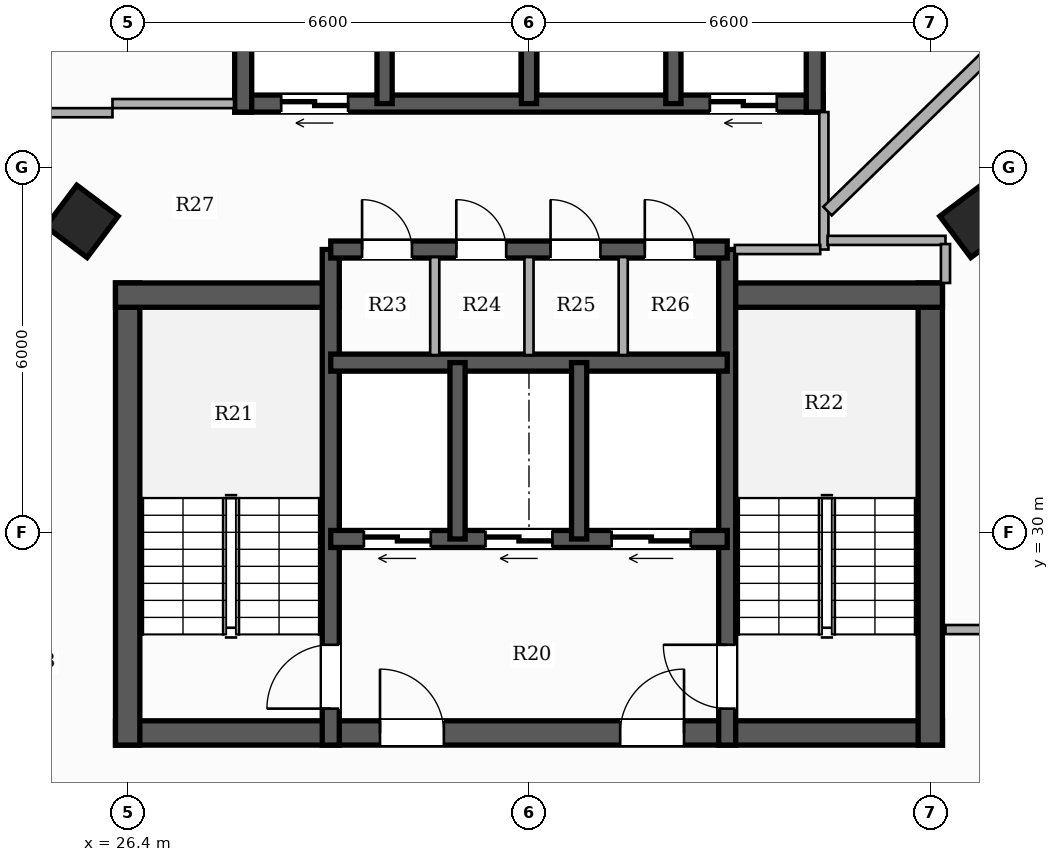
"""IFC4 building model, lengths in metres.
Left out: names, types, materials, properties, quantities, classifications, styles, units other than length and angle.
Written with IfcOpenShell. Run it as: python <this file> out.ifc"""

import sys

from ifc_helpers import new_model, si_unit, direction, frame, frame_2d, origin, origin_2d, place, context, subcontext, project, spatial, rectangle, hollow_rectangle, extrude, element, fill, save


model = new_model("IFC4")
c1 = context("Model", 3, precision=1e-05, world=origin(), true_north=direction((0.0, 1.0)))
c2 = subcontext(c1, "Body", "Model", "MODEL_VIEW")
j1 = project(units=[si_unit("LENGTHUNIT", "METRE"), si_unit("PLANEANGLEUNIT", "RADIAN")], contexts=[c1])
p1 = place(None, origin())
s1 = spatial("IfcSite", under=j1, at=p1, CompositionType="ELEMENT")
p2 = place(p1, origin())
s2 = spatial("IfcBuilding", under=s1, at=p2, CompositionType="ELEMENT")
p3 = place(p2, frame((0.0, 0.0, 106.7)))
s3 = spatial("IfcBuildingStorey", under=s2, at=p3, CompositionType="ELEMENT", Elevation=106.7)
p4 = place(p3, frame((26.2, 26.7, 0.0), z_axis=(0.0, 0.0, 1.0), x_axis=(1.0, 0.0, 0.0)))
e1 = element("IfcWall", 1, at=p4, inside=s3, PredefinedType="SHEAR", context=c2, shape_type="SweptSolid", body=[
    extrude(rectangle(XDim=13.6, YDim=0.4, at=frame_2d((6.8, 0.0))), origin(), (0.0, 0.0, 1.0), 3.3),
])
p5 = place(p4, frame((4.35, 0.0, 0.0)))
e2 = element("IfcOpeningElement", 2, at=p5, cuts=e1, PredefinedType="OPENING", context=c2, shape_type="SweptSolid", body=[
    extrude(rectangle(XDim=1.05, YDim=2.15, at=frame_2d((0.525, 1.075))), frame((0.0, 0.21, 0.0), z_axis=(0.0, -1.0, 0.0), x_axis=(1.0, 0.0, 0.0)), (0.0, 0.0, 1.0), 0.42),
])
p6 = place(p4, frame((8.3, 0.0, 0.0)))
e3 = element("IfcOpeningElement", 3, at=p6, cuts=e1, PredefinedType="OPENING", context=c2, shape_type="SweptSolid", body=[
    extrude(rectangle(XDim=1.05, YDim=2.15, at=frame_2d((0.525, 1.075))), frame((0.0, 0.21, 0.0), z_axis=(0.0, -1.0, 0.0), x_axis=(1.0, 0.0, 0.0)), (0.0, 0.0, 1.0), 0.42),
])
p7 = place(p3, frame((26.4, 26.5, 0.0), z_axis=(0.0, 0.0, 1.0), x_axis=(0.0, 1.0, 0.0)))
e4 = element("IfcWall", 4, at=p7, inside=s3, PredefinedType="SHEAR", context=c2, shape_type="SweptSolid", body=[
    extrude(rectangle(XDim=7.6, YDim=0.4, at=frame_2d((3.8, 0.0))), origin(), (0.0, 0.0, 1.0), 3.3),
])
p8 = place(p3, frame((26.2, 33.9, 0.0), z_axis=(0.0, 0.0, 1.0), x_axis=(1.0, 0.0, 0.0)))
e5 = element("IfcWall", 5, at=p8, inside=s3, PredefinedType="SHEAR", context=c2, shape_type="SweptSolid", body=[
    extrude(rectangle(XDim=3.68, YDim=0.4, at=frame_2d((1.84, 0.0))), origin(), (0.0, 0.0, 1.0), 3.3),
])
p9 = place(p3, frame((39.6, 26.5, 0.0), z_axis=(0.0, 0.0, 1.0), x_axis=(0.0, 1.0, 0.0)))
e6 = element("IfcWall", 6, at=p9, inside=s3, PredefinedType="SHEAR", context=c2, shape_type="SweptSolid", body=[
    extrude(rectangle(XDim=7.6, YDim=0.4, at=frame_2d((3.8, 0.0))), origin(), (0.0, 0.0, 1.0), 3.3),
])
p10 = place(p3, frame((36.12, 33.9, 0.0), z_axis=(0.0, 0.0, 1.0), x_axis=(1.0, 0.0, 0.0)))
e7 = element("IfcWall", 7, at=p10, inside=s3, PredefinedType="SHEAR", context=c2, shape_type="SweptSolid", body=[
    extrude(rectangle(XDim=3.68, YDim=0.4, at=frame_2d((1.84, 0.0))), origin(), (0.0, 0.0, 1.0), 3.3),
])
p11 = place(p3, frame((29.74, 26.5, 0.0), z_axis=(0.0, 0.0, 1.0), x_axis=(0.0, 1.0, 0.0)))
e8 = element("IfcWall", 8, at=p11, inside=s3, PredefinedType="SHEAR", context=c2, shape_type="SweptSolid", body=[
    extrude(rectangle(XDim=8.15, YDim=0.28, at=frame_2d((4.075, 0.0))), origin(), (0.0, 0.0, 1.0), 3.3),
])
p12 = place(p11, frame((0.6, 0.0, 0.0)))
e9 = element("IfcOpeningElement", 9, at=p12, cuts=e8, PredefinedType="OPENING", context=c2, shape_type="SweptSolid", body=[
    extrude(rectangle(XDim=1.05, YDim=2.15, at=frame_2d((0.525, 1.075))), frame((0.0, 0.15, 0.0), z_axis=(0.0, -1.0, 0.0), x_axis=(1.0, 0.0, 0.0)), (0.0, 0.0, 1.0), 0.3),
])
p13 = place(p3, frame((36.26, 26.5, 0.0), z_axis=(0.0, 0.0, 1.0), x_axis=(0.0, 1.0, 0.0)))
e10 = element("IfcWall", 10, at=p13, inside=s3, PredefinedType="SHEAR", context=c2, shape_type="SweptSolid", body=[
    extrude(rectangle(XDim=8.15, YDim=0.28, at=frame_2d((4.075, 0.0))), origin(), (0.0, 0.0, 1.0), 3.3),
])
p14 = place(p13, frame((0.6, 0.0, 0.0)))
e11 = element("IfcOpeningElement", 11, at=p14, cuts=e10, PredefinedType="OPENING", context=c2, shape_type="SweptSolid", body=[
    extrude(rectangle(XDim=1.05, YDim=2.15, at=frame_2d((0.525, 1.075))), frame((0.0, 0.15, 0.0), z_axis=(0.0, -1.0, 0.0), x_axis=(1.0, 0.0, 0.0)), (0.0, 0.0, 1.0), 0.3),
])
p15 = place(p3, frame((36.26, 29.89, 0.0), z_axis=(0.0, 0.0, 1.0), x_axis=(-1.0, 0.0, 0.0)))
e12 = element("IfcWall", 12, at=p15, inside=s3, PredefinedType="SHEAR", context=c2, shape_type="SweptSolid", body=[
    extrude(rectangle(XDim=6.52, YDim=0.28, at=frame_2d((3.26, 0.0))), origin(), (0.0, 0.0, 1.0), 3.3),
])
p16 = place(p15, frame((4.875, 0.0, 0.0)))
e13 = element("IfcOpeningElement", 13, at=p16, cuts=e12, PredefinedType="OPENING", context=c2, shape_type="SweptSolid", body=[
    extrude(rectangle(XDim=1.1, YDim=2.2, at=frame_2d((0.55, 1.1))), frame((0.0, 0.15, 0.0), z_axis=(0.0, -1.0, 0.0), x_axis=(1.0, 0.0, 0.0)), (0.0, 0.0, 1.0), 0.3),
])
p17 = place(p15, frame((2.875, 0.0, 0.0)))
e14 = element("IfcOpeningElement", 14, at=p17, cuts=e12, PredefinedType="OPENING", context=c2, shape_type="SweptSolid", body=[
    extrude(rectangle(XDim=1.1, YDim=2.2, at=frame_2d((0.55, 1.1))), frame((0.0, 0.15, 0.0), z_axis=(0.0, -1.0, 0.0), x_axis=(1.0, 0.0, 0.0)), (0.0, 0.0, 1.0), 0.3),
])
p18 = place(p15, frame((0.6, 0.0, 0.0)))
e15 = element("IfcOpeningElement", 15, at=p18, cuts=e12, PredefinedType="OPENING", context=c2, shape_type="SweptSolid", body=[
    extrude(rectangle(XDim=1.3, YDim=2.2, at=frame_2d((0.65, 1.1))), frame((0.0, 0.15, 0.0), z_axis=(0.0, -1.0, 0.0), x_axis=(1.0, 0.0, 0.0)), (0.0, 0.0, 1.0), 0.3),
])
p19 = place(p3, frame((29.74, 32.79, 0.0), z_axis=(0.0, 0.0, 1.0), x_axis=(1.0, 0.0, 0.0)))
e16 = element("IfcWall", 16, at=p19, inside=s3, PredefinedType="SHEAR", context=c2, shape_type="SweptSolid", body=[
    extrude(rectangle(XDim=6.52, YDim=0.28, at=frame_2d((3.26, 0.0))), origin(), (0.0, 0.0, 1.0), 3.3),
])
for number, where, z_axis, x_axis in (
    (17, (31.825, 29.89, 0.0), (0.0, 0.0, 1.0), (0.0, 1.0, 0.0)),
    (18, (33.825, 29.89, 0.0), (0.0, 0.0, 1.0), (0.0, 1.0, 0.0)),
):
    element("IfcWall", number, at=place(p3, frame(where, z_axis=z_axis, x_axis=x_axis)), inside=s3, PredefinedType="SHEAR", context=c2, shape_type="SweptSolid", body=[
        extrude(rectangle(XDim=2.9, YDim=0.25, at=frame_2d((1.45, 0.0))), origin(), (0.0, 0.0, 1.0), 3.3),
    ])
p20 = place(p3, frame((29.74, 34.65, 0.0), z_axis=(0.0, 0.0, 1.0), x_axis=(1.0, 0.0, 0.0)))
e19 = element("IfcWall", 19, at=p20, inside=s3, PredefinedType="SHEAR", context=c2, shape_type="SweptSolid", body=[
    extrude(rectangle(XDim=6.52, YDim=0.28, at=frame_2d((3.26, 0.0))), origin(), (0.0, 0.0, 1.0), 3.3),
])
p21 = place(p20, frame((0.515, 0.0, 0.0)))
e20 = element("IfcOpeningElement", 20, at=p21, cuts=e19, PredefinedType="OPENING", context=c2, shape_type="SweptSolid", body=[
    extrude(rectangle(XDim=0.82, YDim=2.1, at=frame_2d((0.41, 1.05))), frame((0.0, 0.15, 0.0), z_axis=(0.0, -1.0, 0.0), x_axis=(1.0, 0.0, 0.0)), (0.0, 0.0, 1.0), 0.3),
])
p22 = place(p20, frame((2.065, 0.0, 0.0)))
e21 = element("IfcOpeningElement", 21, at=p22, cuts=e19, PredefinedType="OPENING", context=c2, shape_type="SweptSolid", body=[
    extrude(rectangle(XDim=0.82, YDim=2.1, at=frame_2d((0.41, 1.05))), frame((0.0, 0.15, 0.0), z_axis=(0.0, -1.0, 0.0), x_axis=(1.0, 0.0, 0.0)), (0.0, 0.0, 1.0), 0.3),
])
p23 = place(p20, frame((3.615, 0.0, 0.0)))
e22 = element("IfcOpeningElement", 22, at=p23, cuts=e19, PredefinedType="OPENING", context=c2, shape_type="SweptSolid", body=[
    extrude(rectangle(XDim=0.82, YDim=2.1, at=frame_2d((0.41, 1.05))), frame((0.0, 0.15, 0.0), z_axis=(0.0, -1.0, 0.0), x_axis=(1.0, 0.0, 0.0)), (0.0, 0.0, 1.0), 0.3),
])
p24 = place(p20, frame((5.165, 0.0, 0.0)))
e23 = element("IfcOpeningElement", 23, at=p24, cuts=e19, PredefinedType="OPENING", context=c2, shape_type="SweptSolid", body=[
    extrude(rectangle(XDim=0.82, YDim=2.1, at=frame_2d((0.41, 1.05))), frame((0.0, 0.15, 0.0), z_axis=(0.0, -1.0, 0.0), x_axis=(1.0, 0.0, 0.0)), (0.0, 0.0, 1.0), 0.3),
])
p25 = place(p3, frame((37.84, 37.05, 0.0), z_axis=(0.0, 0.0, 1.0), x_axis=(-1.0, 0.0, 0.0)))
e24 = element("IfcWall", 24, at=p25, inside=s3, PredefinedType="SHEAR", context=c2, shape_type="SweptSolid", body=[
    extrude(rectangle(XDim=9.68, YDim=0.28, at=frame_2d((4.84, 0.0))), origin(), (0.0, 0.0, 1.0), 3.3),
])
p26 = place(p25, frame((7.815, 0.0, 0.0)))
e25 = element("IfcOpeningElement", 25, at=p26, cuts=e24, PredefinedType="OPENING", context=c2, shape_type="SweptSolid", body=[
    extrude(rectangle(XDim=1.1, YDim=2.2, at=frame_2d((0.55, 1.1))), frame((0.0, 0.15, 0.0), z_axis=(0.0, -1.0, 0.0), x_axis=(1.0, 0.0, 0.0)), (0.0, 0.0, 1.0), 0.3),
])
p27 = place(p25, frame((0.765, 0.0, 0.0)))
e26 = element("IfcOpeningElement", 26, at=p27, cuts=e24, PredefinedType="OPENING", context=c2, shape_type="SweptSolid", body=[
    extrude(rectangle(XDim=1.1, YDim=2.2, at=frame_2d((0.55, 1.1))), frame((0.0, 0.15, 0.0), z_axis=(0.0, -1.0, 0.0), x_axis=(1.0, 0.0, 0.0)), (0.0, 0.0, 1.0), 0.3),
])
for number, where, z_axis, x_axis in (
    (27, (28.3, 36.91, 0.0), (0.0, 0.0, 1.0), (0.0, 1.0, 0.0)),
    (28, (37.7, 36.91, 0.0), (0.0, 0.0, 1.0), (0.0, 1.0, 0.0)),
):
    element("IfcWall", number, at=place(p3, frame(where, z_axis=z_axis, x_axis=x_axis)), inside=s3, PredefinedType="SHEAR", context=c2, shape_type="SweptSolid", body=[
        extrude(rectangle(XDim=2.83, YDim=0.28, at=frame_2d((1.415, 0.0))), origin(), (0.0, 0.0, 1.0), 3.3),
    ])
for number, where, z_axis, x_axis in (
    (29, (30.625, 37.05, 0.0), (0.0, 0.0, 1.0), (0.0, 1.0, 0.0)),
    (30, (33.0, 37.05, 0.0), (0.0, 0.0, 1.0), (0.0, 1.0, 0.0)),
    (31, (35.375, 37.05, 0.0), (0.0, 0.0, 1.0), (0.0, 1.0, 0.0)),
):
    element("IfcWall", number, at=place(p3, frame(where, z_axis=z_axis, x_axis=x_axis)), inside=s3, PredefinedType="SHEAR", context=c2, shape_type="SweptSolid", body=[
        extrude(rectangle(XDim=2.55, YDim=0.25, at=frame_2d((1.275, 0.0))), origin(), (0.0, 0.0, 1.0), 3.3),
    ])
for number, where, z_axis, x_axis in (
    (32, (25.648, 35.113, 0.0), (0.0, 0.0, 1.0), (0.6, 0.8, 0.0)),
    (33, (40.352, 35.113, 0.0), (0.0, 0.0, 1.0), (-0.6, 0.8, 0.0)),
):
    element("IfcColumn", number, at=place(p3, frame(where, z_axis=z_axis, x_axis=x_axis)), inside=s3, PredefinedType="COLUMN", context=c2, shape_type="SweptSolid", body=[
        extrude(hollow_rectangle(XDim=0.85, YDim=0.85, WallThickness=0.028, at=origin_2d()), origin(), (0.0, 0.0, 1.0), 3.3),
    ])
p28 = place(p3, frame((37.85, 34.65, 0.0), z_axis=(0.0, 0.0, 1.0), x_axis=(0.0, 1.0, 0.0)))
e34 = element("IfcWall", 34, at=p28, inside=s3, PredefinedType="PARTITIONING", context=c2, shape_type="SweptSolid", body=[
    extrude(rectangle(XDim=2.26, YDim=0.15, at=frame_2d((1.13, 0.0))), origin(), (0.0, 0.0, 1.0), 3.06),
])
p29 = place(p3, frame((36.385, 34.65, 0.0), z_axis=(0.0, 0.0, 1.0), x_axis=(1.0, 0.0, 0.0)))
e35 = element("IfcWall", 35, at=p29, inside=s3, PredefinedType="PARTITIONING", context=c2, shape_type="SweptSolid", body=[
    extrude(rectangle(XDim=1.405, YDim=0.15, at=frame_2d((0.703, 0.0))), origin(), (0.0, 0.0, 1.0), 2.425),
])
for number, where, z_axis, x_axis in (
    (36, (31.45, 32.915, 0.0), (0.0, 0.0, 1.0), (0.0, 1.0, 0.0)),
    (37, (33.0, 32.915, 0.0), (0.0, 0.0, 1.0), (0.0, 1.0, 0.0)),
    (38, (34.55, 32.915, 0.0), (0.0, 0.0, 1.0), (0.0, 1.0, 0.0)),
):
    element("IfcWall", number, at=place(p3, frame(where, z_axis=z_axis, x_axis=x_axis)), inside=s3, PredefinedType="PARTITIONING", context=c2, shape_type="SweptSolid", body=[
        extrude(rectangle(XDim=1.61, YDim=0.15, at=frame_2d((0.805, 0.0))), origin(), (0.0, 0.0, 1.0), 3.06),
    ])
p30 = place(p3, frame((23.56, 36.9, 0.0), z_axis=(0.0, 0.0, 1.0), x_axis=(1.0, 0.0, 0.0)))
e39 = element("IfcWall", 39, at=p30, inside=s3, PredefinedType="PARTITIONING", context=c2, shape_type="SweptSolid", body=[
    extrude(rectangle(XDim=2.59, YDim=0.15, at=frame_2d((1.295, 0.0))), origin(), (0.0, 0.0, 1.0), 2.413),
])
p31 = place(p30, frame((0.515, 0.0, 0.0)))
e40 = element("IfcOpeningElement", 40, at=p31, cuts=e39, PredefinedType="OPENING", context=c2, shape_type="SweptSolid", body=[
    extrude(rectangle(XDim=0.88, YDim=2.1, at=frame_2d((0.44, 1.05))), frame((0.0, 0.085, 0.0), z_axis=(0.0, -1.0, 0.0), x_axis=(1.0, 0.0, 0.0)), (0.0, 0.0, 1.0), 0.17),
])
p32 = place(p3, frame((39.85, 28.4, 0.0), z_axis=(0.0, 0.0, 1.0), x_axis=(1.0, 0.0, 0.0)))
e41 = element("IfcWall", 41, at=p32, inside=s3, PredefinedType="PARTITIONING", context=c2, shape_type="SweptSolid", body=[
    extrude(rectangle(XDim=2.5, YDim=0.15, at=frame_2d((1.25, 0.0))), origin(), (0.0, 0.0, 1.0), 2.721),
])
p33 = place(p3, frame((26.15, 37.05, 0.0), z_axis=(0.0, 0.0, 1.0), x_axis=(1.0, 0.0, 0.0)))
e42 = element("IfcWall", 42, at=p33, inside=s3, PredefinedType="PARTITIONING", context=c2, shape_type="SweptSolid", body=[
    extrude(rectangle(XDim=2.0, YDim=0.15, at=frame_2d((1.0, 0.0))), origin(), (0.0, 0.0, 1.0), 2.413),
])
p34 = place(p3, frame((37.91, 34.8, 0.0), z_axis=(0.0, 0.0, 1.0), x_axis=(1.0, 0.0, 0.0)))
e43 = element("IfcWall", 43, at=p34, inside=s3, PredefinedType="PARTITIONING", context=c2, shape_type="SweptSolid", body=[
    extrude(rectangle(XDim=1.94, YDim=0.15, at=frame_2d((0.97, 0.0))), origin(), (0.0, 0.0, 1.0), 2.721),
])
p35 = place(p3, frame((39.85, 34.74, 0.0), z_axis=(0.0, 0.0, 1.0), x_axis=(0.0, -1.0, 0.0)))
e44 = element("IfcWall", 44, at=p35, inside=s3, PredefinedType="PARTITIONING", context=c2, shape_type="SweptSolid", body=[
    extrude(rectangle(XDim=0.64, YDim=0.15, at=frame_2d((0.32, 0.0))), origin(), (0.0, 0.0, 1.0), 2.721),
])
p36 = place(p3, frame((37.91, 35.282, 0.0), z_axis=(0.0, 0.0, 1.0), x_axis=(0.716392659664, 0.697697324905, 0.0)))
e45 = element("IfcWall", 45, at=p36, inside=s3, PredefinedType="PARTITIONING", context=c2, shape_type="SweptSolid", body=[
    extrude(rectangle(XDim=6.216, YDim=0.2, at=frame_2d((3.108, 0.0))), origin(), (0.0, 0.0, 1.0), 2.413),
])
p37 = place(p12, origin())
e46 = element("IfcDoor", 46, at=p37, inside=s3, OperationType="SINGLE_SWING_LEFT", PredefinedType="DOOR", context=c2, shape_type="SweptSolid", body=[
    extrude(rectangle(XDim=1.05, YDim=2.15, at=frame_2d((0.525, 1.075))), frame((0.0, 0.025, 0.0), z_axis=(0.0, -1.0, 0.0), x_axis=(1.0, 0.0, 0.0)), (0.0, 0.0, 1.0), 0.05),
])
fill(e9, e46)
p38 = place(p14, origin())
e47 = element("IfcDoor", 47, at=p38, inside=s3, OperationType="SINGLE_SWING_RIGHT", PredefinedType="DOOR", context=c2, shape_type="SweptSolid", body=[
    extrude(rectangle(XDim=1.05, YDim=2.15, at=frame_2d((0.525, 1.075))), frame((0.0, 0.025, 0.0), z_axis=(0.0, -1.0, 0.0), x_axis=(1.0, 0.0, 0.0)), (0.0, 0.0, 1.0), 0.05),
])
fill(e11, e47)
p39 = place(p5, origin())
e48 = element("IfcDoor", 48, at=p39, inside=s3, OperationType="SINGLE_SWING_LEFT", PredefinedType="DOOR", context=c2, shape_type="SweptSolid", body=[
    extrude(rectangle(XDim=1.05, YDim=2.15, at=frame_2d((0.525, 1.075))), frame((0.0, 0.025, 0.0), z_axis=(0.0, -1.0, 0.0), x_axis=(1.0, 0.0, 0.0)), (0.0, 0.0, 1.0), 0.05),
])
fill(e2, e48)
p40 = place(p6, origin())
e49 = element("IfcDoor", 49, at=p40, inside=s3, OperationType="SINGLE_SWING_RIGHT", PredefinedType="DOOR", context=c2, shape_type="SweptSolid", body=[
    extrude(rectangle(XDim=1.05, YDim=2.15, at=frame_2d((0.525, 1.075))), frame((0.0, 0.025, 0.0), z_axis=(0.0, -1.0, 0.0), x_axis=(1.0, 0.0, 0.0)), (0.0, 0.0, 1.0), 0.05),
])
fill(e3, e49)
p41 = place(p16, origin())
e50 = element("IfcDoor", 50, at=p41, inside=s3, OperationType="DOUBLE_DOOR_SLIDING", PredefinedType="DOOR", context=c2, shape_type="SweptSolid", body=[
    extrude(rectangle(XDim=1.1, YDim=2.2, at=frame_2d((0.55, 1.1))), frame((0.0, 0.025, 0.0), z_axis=(0.0, -1.0, 0.0), x_axis=(1.0, 0.0, 0.0)), (0.0, 0.0, 1.0), 0.05),
])
fill(e13, e50)
p42 = place(p17, origin())
e51 = element("IfcDoor", 51, at=p42, inside=s3, OperationType="DOUBLE_DOOR_SLIDING", PredefinedType="DOOR", context=c2, shape_type="SweptSolid", body=[
    extrude(rectangle(XDim=1.1, YDim=2.2, at=frame_2d((0.55, 1.1))), frame((0.0, 0.025, 0.0), z_axis=(0.0, -1.0, 0.0), x_axis=(1.0, 0.0, 0.0)), (0.0, 0.0, 1.0), 0.05),
])
fill(e14, e51)
p43 = place(p18, origin())
e52 = element("IfcDoor", 52, at=p43, inside=s3, OperationType="DOUBLE_DOOR_SLIDING", PredefinedType="DOOR", context=c2, shape_type="SweptSolid", body=[
    extrude(rectangle(XDim=1.3, YDim=2.2, at=frame_2d((0.65, 1.1))), frame((0.0, 0.025, 0.0), z_axis=(0.0, -1.0, 0.0), x_axis=(1.0, 0.0, 0.0)), (0.0, 0.0, 1.0), 0.05),
])
fill(e15, e52)
p44 = place(p26, origin())
e53 = element("IfcDoor", 53, at=p44, inside=s3, OperationType="DOUBLE_DOOR_SLIDING", PredefinedType="DOOR", context=c2, shape_type="SweptSolid", body=[
    extrude(rectangle(XDim=1.1, YDim=2.2, at=frame_2d((0.55, 1.1))), frame((0.0, 0.025, 0.0), z_axis=(0.0, -1.0, 0.0), x_axis=(1.0, 0.0, 0.0)), (0.0, 0.0, 1.0), 0.05),
])
fill(e25, e53)
p45 = place(p27, origin())
e54 = element("IfcDoor", 54, at=p45, inside=s3, OperationType="DOUBLE_DOOR_SLIDING", PredefinedType="DOOR", context=c2, shape_type="SweptSolid", body=[
    extrude(rectangle(XDim=1.1, YDim=2.2, at=frame_2d((0.55, 1.1))), frame((0.0, 0.025, 0.0), z_axis=(0.0, -1.0, 0.0), x_axis=(1.0, 0.0, 0.0)), (0.0, 0.0, 1.0), 0.05),
])
fill(e26, e54)
p46 = place(p21, origin())
e55 = element("IfcDoor", 55, at=p46, inside=s3, OperationType="SINGLE_SWING_LEFT", PredefinedType="DOOR", context=c2, shape_type="SweptSolid", body=[
    extrude(rectangle(XDim=0.82, YDim=2.1, at=frame_2d((0.41, 1.05))), frame((0.0, 0.025, 0.0), z_axis=(0.0, -1.0, 0.0), x_axis=(1.0, 0.0, 0.0)), (0.0, 0.0, 1.0), 0.05),
])
fill(e20, e55)
p47 = place(p22, origin())
e56 = element("IfcDoor", 56, at=p47, inside=s3, OperationType="SINGLE_SWING_LEFT", PredefinedType="DOOR", context=c2, shape_type="SweptSolid", body=[
    extrude(rectangle(XDim=0.82, YDim=2.1, at=frame_2d((0.41, 1.05))), frame((0.0, 0.025, 0.0), z_axis=(0.0, -1.0, 0.0), x_axis=(1.0, 0.0, 0.0)), (0.0, 0.0, 1.0), 0.05),
])
fill(e21, e56)
p48 = place(p23, origin())
e57 = element("IfcDoor", 57, at=p48, inside=s3, OperationType="SINGLE_SWING_LEFT", PredefinedType="DOOR", context=c2, shape_type="SweptSolid", body=[
    extrude(rectangle(XDim=0.82, YDim=2.1, at=frame_2d((0.41, 1.05))), frame((0.0, 0.025, 0.0), z_axis=(0.0, -1.0, 0.0), x_axis=(1.0, 0.0, 0.0)), (0.0, 0.0, 1.0), 0.05),
])
fill(e22, e57)
p49 = place(p24, origin())
e58 = element("IfcDoor", 58, at=p49, inside=s3, OperationType="SINGLE_SWING_LEFT", PredefinedType="DOOR", context=c2, shape_type="SweptSolid", body=[
    extrude(rectangle(XDim=0.82, YDim=2.1, at=frame_2d((0.41, 1.05))), frame((0.0, 0.025, 0.0), z_axis=(0.0, -1.0, 0.0), x_axis=(1.0, 0.0, 0.0)), (0.0, 0.0, 1.0), 0.05),
])
fill(e23, e58)
save(model, sys.argv[1])
